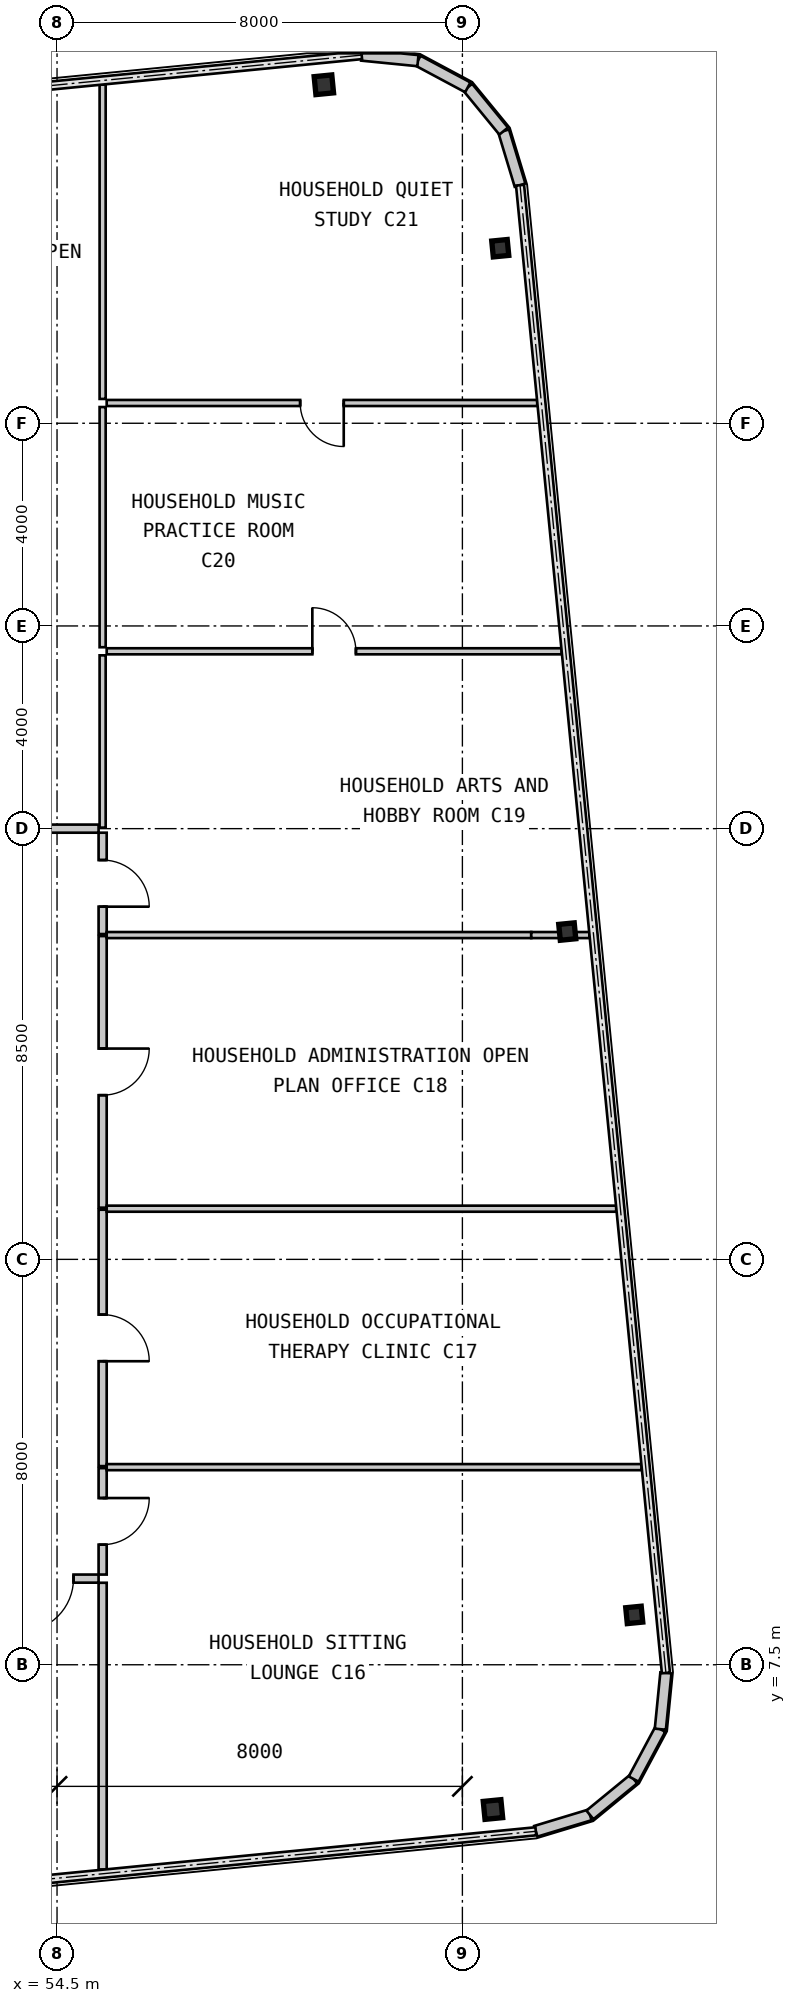
"""IFC4 building model, lengths in metres.
Left out: names, types, materials, properties, quantities, classifications, styles, units other than length and angle.
Written with IfcOpenShell. Run it as: python <this file> out.ifc"""

import sys

from ifc_helpers import new_model, si_unit, direction, frame, frame_2d, origin, origin_2d, place, context, subcontext, project, spatial, rectangle, i_section, extrude, source, transform, mapped, element, fill, save


model = new_model("IFC4")
c1 = context("Model", 3, precision=1e-05, world=origin(), true_north=direction((0.0, 1.0)))
c2 = subcontext(c1, "Body", "Model", "MODEL_VIEW")
j1 = project(units=[si_unit("LENGTHUNIT", "METRE"), si_unit("PLANEANGLEUNIT", "RADIAN")], contexts=[c1])
p1 = place(None, origin())
s1 = spatial("IfcSite", under=j1, at=p1, CompositionType="ELEMENT")
p2 = place(p1, origin())
s2 = spatial("IfcBuilding", under=s1, at=p2, CompositionType="ELEMENT")
p3 = place(p2, frame((0.0, 0.0, 68.25)))
s3 = spatial("IfcBuildingStorey", under=s2, at=p3, CompositionType="ELEMENT", Elevation=68.25)
m1 = source(origin(), c2, "Body", "SweptSolid", [
    extrude(i_section(OverallWidth=0.35, OverallDepth=0.356, WebThickness=0.018, FlangeThickness=0.028, at=origin_2d()), origin(), (0.0, 0.0, 1.0), 3.15),
])
for number, where, z_axis, x_axis in (
    (1, (63.103, 4.643, 0.0), (0.0, 0.0, 1.0), (0.995, 0.098, 0.0)),
    (2, (59.766, 38.68, 0.0), (0.0, 0.0, 1.0), (0.995, 0.098, 0.0)),
):
    element("IfcColumn", number, at=place(p3, frame(where, z_axis=z_axis, x_axis=x_axis)), inside=s3, PredefinedType="COLUMN", context=c2, shape_type="MappedRepresentation", body=[
        mapped(m1, transform((0.0, 0.0, 0.0), scale=1.0)),
    ])
m2 = source(origin(), c2, "Body", "SweptSolid", [
    extrude(i_section(OverallWidth=0.307, OverallDepth=0.315, WebThickness=0.012, FlangeThickness=0.019, at=origin_2d()), origin(), (0.0, 0.0, 1.0), 3.15),
])
for number, where, z_axis, x_axis in (
    (3, (65.892, 8.484, 0.0), (0.0, 0.0, 1.0), (0.995, 0.098, 0.0)),
    (4, (64.57, 21.969, 0.0), (0.0, 0.0, 1.0), (0.995, 0.098, 0.0)),
    (5, (63.247, 35.454, 0.0), (0.0, 0.0, 1.0), (0.995, 0.098, 0.0)),
):
    element("IfcColumn", number, at=place(p3, frame(where, z_axis=z_axis, x_axis=x_axis)), inside=s3, PredefinedType="COLUMN", context=c2, shape_type="MappedRepresentation", body=[
        mapped(m2, transform((0.0, 0.0, 0.0), scale=1.0)),
    ])
m3 = source(origin(), c2, "Body", "SweptSolid", [
    extrude(rectangle(XDim=1.116, YDim=0.22, at=frame_2d((0.558, 0.0))), origin(), (0.0, 0.0, 1.0), 2.93),
])
p4 = place(p3, frame((63.949, 4.214, 0.0), z_axis=(0.0, 0.0, 1.0), x_axis=(0.957052003726, 0.289916301997, 0.0)))
e6 = element("IfcWall", 6, at=p4, inside=s3, PredefinedType="SOLIDWALL", context=c2, shape_type="MappedRepresentation", body=[
    mapped(m3, transform((0.0, 0.0, 0.0), scale=1.0)),
])
m4 = source(origin(), c2, "Body", "SweptSolid", [
    extrude(rectangle(XDim=1.116, YDim=0.22, at=frame_2d((0.558, 0.0))), origin(), (0.0, 0.0, 1.0), 2.93),
])
p5 = place(p3, frame((65.017, 4.537, 0.0), z_axis=(0.0, 0.0, 1.0), x_axis=(0.773342870285, 0.633988016432, 0.0)))
e7 = element("IfcWall", 7, at=p5, inside=s3, PredefinedType="SOLIDWALL", context=c2, shape_type="MappedRepresentation", body=[
    mapped(m4, transform((0.0, 0.0, 0.0), scale=1.0)),
])
p6 = place(p3, frame((65.88, 5.245, 0.0), z_axis=(0.0, 0.0, 1.0), x_axis=(0.471723463201, 0.881746547635, 0.0)))
e8 = element("IfcWall", 8, at=p6, inside=s3, PredefinedType="SOLIDWALL", context=c2, shape_type="MappedRepresentation", body=[
    mapped(m3, transform((0.0, 0.0, 0.0), scale=1.0)),
])
for number, where, z_axis, x_axis in (
    (9, (66.406, 6.229, 0.0), (0.0, 0.0, 1.0), (0.098, 0.995, 0.0)),
    (10, (63.638, 36.698, 0.0), (0.0, 0.0, 1.0), (-0.29, 0.957, 0.0)),
):
    element("IfcWall", number, at=place(p3, frame(where, z_axis=z_axis, x_axis=x_axis)), inside=s3, PredefinedType="SOLIDWALL", context=c2, shape_type="MappedRepresentation", body=[
        mapped(m4, transform((0.0, 0.0, 0.0), scale=1.0)),
    ])
p7 = place(p3, frame((63.314, 37.766, 0.0), z_axis=(0.0, 0.0, 1.0), x_axis=(-0.634095287989, 0.773254916409, 0.0)))
e11 = element("IfcWall", 11, at=p7, inside=s3, PredefinedType="SOLIDWALL", context=c2, shape_type="MappedRepresentation", body=[
    mapped(m3, transform((0.0, 0.0, 0.0), scale=1.0)),
])
for number, where, z_axis, x_axis in (
    (12, (62.607, 38.629, 0.0), (0.0, 0.0, 1.0), (-0.882, 0.472, 0.0)),
    (13, (61.623, 39.156, 0.0), (0.0, 0.0, 1.0), (-0.995, 0.098, 0.0)),
):
    element("IfcWall", number, at=place(p3, frame(where, z_axis=z_axis, x_axis=x_axis)), inside=s3, PredefinedType="SOLIDWALL", context=c2, shape_type="MappedRepresentation", body=[
        mapped(m4, transform((0.0, 0.0, 0.0), scale=1.0)),
    ])
m5 = source(origin(), c2, "Body", "SweptSolid", [
    extrude(rectangle(XDim=2.04, YDim=0.16, at=frame_2d((1.02, 0.0))), origin(), (0.0, 0.0, 1.0), 2.93),
])
p8 = place(p3, frame((55.32, 9.2, 0.0), z_axis=(0.0, 0.0, 1.0), x_axis=(-1.0, 0.0, 0.0)))
e14 = element("IfcWall", 14, at=p8, inside=s3, PredefinedType="PARTITIONING", context=c2, shape_type="MappedRepresentation", body=[
    mapped(m5, transform((0.0, 0.0, 0.0), scale=1.0)),
])
m6 = source(origin(), c2, "Body", "SweptSolid", [
    extrude(rectangle(XDim=1.05, YDim=2.1, at=frame_2d((0.525, 1.05))), frame((0.0, 0.09, 0.0), z_axis=(0.0, -1.0, 0.0), x_axis=(1.0, 0.0, 0.0)), (0.0, 0.0, 1.0), 0.18),
])
p9 = place(p8, frame((0.495, 0.0, 0.0)))
e15 = element("IfcOpeningElement", 15, at=p9, cuts=e14, PredefinedType="OPENING", context=c2, shape_type="MappedRepresentation", body=[
    mapped(m6, transform((0.0, 0.0, 0.0), scale=1.0)),
])
m7 = source(origin(), c2, "Body", "SweptSolid", [
    extrude(rectangle(XDim=2.1, YDim=0.16, at=frame_2d((1.05, 0.0))), origin(), (0.0, 0.0, 1.0), 2.93),
])
p10 = place(p3, frame((55.4, 11.38, 0.0), z_axis=(0.0, 0.0, 1.0), x_axis=(0.0, -1.0, 0.0)))
e16 = element("IfcWall", 16, at=p10, inside=s3, PredefinedType="PARTITIONING", context=c2, shape_type="MappedRepresentation", body=[
    mapped(m7, transform((0.0, 0.0, 0.0), scale=1.0)),
])
m8 = source(origin(), c2, "Body", "SweptSolid", [
    extrude(rectangle(XDim=0.92, YDim=2.1, at=frame_2d((0.46, 1.05))), frame((0.0, 0.09, 0.0), z_axis=(0.0, -1.0, 0.0), x_axis=(1.0, 0.0, 0.0)), (0.0, 0.0, 1.0), 0.18),
])
p11 = place(p10, frame((0.59, 0.0, 0.0)))
e17 = element("IfcOpeningElement", 17, at=p11, cuts=e16, PredefinedType="OPENING", context=c2, shape_type="MappedRepresentation", body=[
    mapped(m8, transform((0.0, 0.0, 0.0), scale=1.0)),
])
m9 = source(origin(), c2, "Body", "SweptSolid", [
    extrude(rectangle(XDim=5.06, YDim=0.16, at=frame_2d((2.53, 0.0))), origin(), (0.0, 0.0, 1.0), 2.93),
])
p12 = place(p3, frame((55.4, 16.48, 0.0), z_axis=(0.0, 0.0, 1.0), x_axis=(0.0, -1.0, 0.0)))
e18 = element("IfcWall", 18, at=p12, inside=s3, PredefinedType="PARTITIONING", context=c2, shape_type="MappedRepresentation", body=[
    mapped(m9, transform((0.0, 0.0, 0.0), scale=1.0)),
])
p13 = place(p12, frame((2.07, 0.0, 0.0)))
e19 = element("IfcOpeningElement", 19, at=p13, cuts=e18, PredefinedType="OPENING", context=c2, shape_type="MappedRepresentation", body=[
    mapped(m8, transform((0.0, 0.0, 0.0), scale=1.0)),
])
m10 = source(origin(), c2, "Body", "SweptSolid", [
    extrude(rectangle(XDim=5.36, YDim=0.16, at=frame_2d((2.68, 0.0))), origin(), (0.0, 0.0, 1.0), 2.93),
])
p14 = place(p3, frame((55.4, 21.88, 0.0), z_axis=(0.0, 0.0, 1.0), x_axis=(0.0, -1.0, 0.0)))
e20 = element("IfcWall", 20, at=p14, inside=s3, PredefinedType="PARTITIONING", context=c2, shape_type="MappedRepresentation", body=[
    mapped(m10, transform((0.0, 0.0, 0.0), scale=1.0)),
])
p15 = place(p14, frame((2.22, 0.0, 0.0)))
e21 = element("IfcOpeningElement", 21, at=p15, cuts=e20, PredefinedType="OPENING", context=c2, shape_type="MappedRepresentation", body=[
    mapped(m8, transform((0.0, 0.0, 0.0), scale=1.0)),
])
m11 = source(origin(), c2, "Body", "SweptSolid", [
    extrude(rectangle(XDim=2.0, YDim=0.16, at=frame_2d((1.0, 0.0))), origin(), (0.0, 0.0, 1.0), 2.93),
])
p16 = place(p3, frame((55.4, 23.92, 0.0), z_axis=(0.0, 0.0, 1.0), x_axis=(0.0, -1.0, 0.0)))
e22 = element("IfcWall", 22, at=p16, inside=s3, PredefinedType="PARTITIONING", context=c2, shape_type="MappedRepresentation", body=[
    mapped(m11, transform((0.0, 0.0, 0.0), scale=1.0)),
])
p17 = place(p16, frame((0.54, 0.0, 0.0)))
e23 = element("IfcOpeningElement", 23, at=p17, cuts=e22, PredefinedType="OPENING", context=c2, shape_type="MappedRepresentation", body=[
    mapped(m8, transform((0.0, 0.0, 0.0), scale=1.0)),
])
m12 = source(origin(), c2, "Body", "SweptSolid", [
    extrude(rectangle(XDim=3.016, YDim=0.16, at=frame_2d((1.508, 0.0))), origin(), (0.0, 0.0, 1.0), 2.93),
])
p18 = place(p3, frame((52.304, 24.0, 0.0), z_axis=(0.0, 0.0, 1.0), x_axis=(1.0, 0.0, 0.0)))
e24 = element("IfcWall", 24, at=p18, inside=s3, PredefinedType="PARTITIONING", context=c2, shape_type="MappedRepresentation", body=[
    mapped(m12, transform((0.0, 0.0, 0.0), scale=1.0)),
])
m13 = source(origin(), c2, "Body", "SweptSolid", [
    extrude(rectangle(XDim=5.658, YDim=0.16, at=frame_2d((2.829, 0.0))), origin(), (0.0, 0.0, 1.0), 2.93),
])
p19 = place(p3, frame((55.4, 9.118, 0.0), z_axis=(0.0, 0.0, 1.0), x_axis=(0.0, -1.0, 0.0)))
e25 = element("IfcWall", 25, at=p19, inside=s3, PredefinedType="PARTITIONING", context=c2, shape_type="MappedRepresentation", body=[
    mapped(m13, transform((0.0, 0.0, 0.0), scale=1.0)),
])
m14 = source(origin(), c2, "Body", "SweptSolid", [
    extrude(rectangle(XDim=10.556, YDim=0.12, at=frame_2d((5.278, 0.0))), origin(), (0.0, 0.0, 1.0), 2.93),
])
p20 = place(p3, frame((55.48, 11.4, 0.0), z_axis=(0.0, 0.0, 1.0), x_axis=(1.0, 0.0, 0.0)))
e26 = element("IfcWall", 26, at=p20, inside=s3, PredefinedType="PARTITIONING", context=c2, shape_type="MappedRepresentation", body=[
    mapped(m14, transform((0.0, 0.0, 0.0), scale=1.0)),
])
m15 = source(origin(), c2, "Body", "SweptSolid", [
    extrude(rectangle(XDim=10.056, YDim=0.12, at=frame_2d((5.028, 0.0))), origin(), (0.0, 0.0, 1.0), 2.93),
])
p21 = place(p3, frame((55.48, 16.5, 0.0), z_axis=(0.0, 0.0, 1.0), x_axis=(1.0, 0.0, 0.0)))
e27 = element("IfcWall", 27, at=p21, inside=s3, PredefinedType="PARTITIONING", context=c2, shape_type="MappedRepresentation", body=[
    mapped(m15, transform((0.0, 0.0, 0.0), scale=1.0)),
])
m16 = source(origin(), c2, "Body", "SweptSolid", [
    extrude(rectangle(XDim=8.379, YDim=0.12, at=frame_2d((4.189, 0.0))), origin(), (0.0, 0.0, 1.0), 2.93),
])
p22 = place(p3, frame((55.48, 21.9, 0.0), z_axis=(0.0, 0.0, 1.0), x_axis=(1.0, 0.0, 0.0)))
e28 = element("IfcWall", 28, at=p22, inside=s3, PredefinedType="PARTITIONING", context=c2, shape_type="MappedRepresentation", body=[
    mapped(m16, transform((0.0, 0.0, 0.0), scale=1.0)),
])
m17 = source(origin(), c2, "Body", "SweptSolid", [
    extrude(rectangle(XDim=0.709, YDim=0.12, at=frame_2d((0.354, 0.0))), origin(), (0.0, 0.0, 1.0), 2.328),
])
p23 = place(p3, frame((63.859, 21.9, 0.0), z_axis=(0.0, 0.0, 1.0), x_axis=(1.0, 0.0, 0.0)))
e29 = element("IfcWall", 29, at=p23, inside=s3, PredefinedType="PARTITIONING", context=c2, shape_type="MappedRepresentation", body=[
    mapped(m17, transform((0.0, 0.0, 0.0), scale=1.0)),
])
m18 = source(origin(), c2, "Body", "SweptSolid", [
    extrude(rectangle(XDim=0.438, YDim=0.12, at=frame_2d((0.219, 0.0))), origin(), (0.0, 0.0, 1.0), 2.93),
])
p24 = place(p3, frame((64.568, 21.9, 0.0), z_axis=(0.0, 0.0, 1.0), x_axis=(1.0, 0.0, 0.0)))
e30 = element("IfcWall", 30, at=p24, inside=s3, PredefinedType="PARTITIONING", context=c2, shape_type="MappedRepresentation", body=[
    mapped(m18, transform((0.0, 0.0, 0.0), scale=1.0)),
])
m19 = source(origin(), c2, "Body", "SweptSolid", [
    extrude(rectangle(XDim=8.977, YDim=0.12, at=frame_2d((4.489, 0.0))), origin(), (0.0, 0.0, 1.0), 2.93),
])
p25 = place(p3, frame((55.48, 27.5, 0.0), z_axis=(0.0, 0.0, 1.0), x_axis=(1.0, 0.0, 0.0)))
e31 = element("IfcWall", 31, at=p25, inside=s3, PredefinedType="PARTITIONING", context=c2, shape_type="MappedRepresentation", body=[
    mapped(m19, transform((0.0, 0.0, 0.0), scale=1.0)),
])
m20 = source(origin(), c2, "Body", "SweptSolid", [
    extrude(rectangle(XDim=0.86, YDim=2.1, at=frame_2d((0.43, 1.05))), frame((0.0, 0.07, 0.0), z_axis=(0.0, -1.0, 0.0), x_axis=(1.0, 0.0, 0.0)), (0.0, 0.0, 1.0), 0.14),
])
p26 = place(p25, frame((4.059, 0.0, 0.0)))
e32 = element("IfcOpeningElement", 32, at=p26, cuts=e31, PredefinedType="OPENING", context=c2, shape_type="MappedRepresentation", body=[
    mapped(m20, transform((0.0, 0.0, 0.0), scale=1.0)),
])
m21 = source(origin(), c2, "Body", "SweptSolid", [
    extrude(rectangle(XDim=3.4, YDim=0.12, at=frame_2d((1.7, 0.0))), origin(), (0.0, 0.0, 1.0), 2.93),
])
p27 = place(p3, frame((55.4, 24.02, 0.0), z_axis=(0.0, 0.0, 1.0), x_axis=(0.0, 1.0, 0.0)))
e33 = element("IfcWall", 33, at=p27, inside=s3, PredefinedType="PARTITIONING", context=c2, shape_type="MappedRepresentation", body=[
    mapped(m21, transform((0.0, 0.0, 0.0), scale=1.0)),
])
m22 = source(origin(), c2, "Body", "SweptSolid", [
    extrude(rectangle(XDim=8.497, YDim=0.12, at=frame_2d((4.248, 0.0))), origin(), (0.0, 0.0, 1.0), 2.93),
])
p28 = place(p3, frame((55.48, 32.4, 0.0), z_axis=(0.0, 0.0, 1.0), x_axis=(1.0, 0.0, 0.0)))
e34 = element("IfcWall", 34, at=p28, inside=s3, PredefinedType="PARTITIONING", context=c2, shape_type="MappedRepresentation", body=[
    mapped(m22, transform((0.0, 0.0, 0.0), scale=1.0)),
])
p29 = place(p28, frame((3.818, 0.0, 0.0)))
e35 = element("IfcOpeningElement", 35, at=p29, cuts=e34, PredefinedType="OPENING", context=c2, shape_type="MappedRepresentation", body=[
    mapped(m20, transform((0.0, 0.0, 0.0), scale=1.0)),
])
m23 = source(origin(), c2, "Body", "SweptSolid", [
    extrude(rectangle(XDim=4.74, YDim=0.12, at=frame_2d((2.37, 0.0))), origin(), (0.0, 0.0, 1.0), 2.93),
])
p30 = place(p3, frame((55.4, 27.58, 0.0), z_axis=(0.0, 0.0, 1.0), x_axis=(0.0, 1.0, 0.0)))
e36 = element("IfcWall", 36, at=p30, inside=s3, PredefinedType="PARTITIONING", context=c2, shape_type="MappedRepresentation", body=[
    mapped(m23, transform((0.0, 0.0, 0.0), scale=1.0)),
])
m24 = source(origin(), c2, "Body", "SweptSolid", [
    extrude(rectangle(XDim=6.202, YDim=0.12, at=frame_2d((3.101, 0.0))), origin(), (0.0, 0.0, 1.0), 2.93),
])
p31 = place(p3, frame((55.4, 32.48, 0.0), z_axis=(0.0, 0.0, 1.0), x_axis=(0.0, 1.0, 0.0)))
e37 = element("IfcWall", 37, at=p31, inside=s3, PredefinedType="PARTITIONING", context=c2, shape_type="MappedRepresentation", body=[
    mapped(m24, transform((0.0, 0.0, 0.0), scale=1.0)),
])
m25 = source(origin(), c2, "Body", "SweptSolid", [
    extrude(rectangle(XDim=1.05, YDim=2.1, at=frame_2d((0.525, 1.05))), frame((0.0, 0.025, 0.0), z_axis=(0.0, -1.0, 0.0), x_axis=(1.0, 0.0, 0.0)), (0.0, 0.0, 1.0), 0.05),
])
p32 = place(p9, origin())
e38 = element("IfcDoor", 38, at=p32, inside=s3, OperationType="SINGLE_SWING_RIGHT", PredefinedType="DOOR", context=c2, shape_type="MappedRepresentation", body=[
    mapped(m25, transform((0.0, 0.0, 0.0), scale=1.0)),
])
fill(e15, e38)
m26 = source(origin(), c2, "Body", "SweptSolid", [
    extrude(rectangle(XDim=0.92, YDim=2.1, at=frame_2d((0.46, 1.05))), frame((0.0, 0.025, 0.0), z_axis=(0.0, -1.0, 0.0), x_axis=(1.0, 0.0, 0.0)), (0.0, 0.0, 1.0), 0.05),
])
p33 = place(p11, origin())
e39 = element("IfcDoor", 39, at=p33, inside=s3, OperationType="SINGLE_SWING_LEFT", PredefinedType="DOOR", context=c2, shape_type="MappedRepresentation", body=[
    mapped(m26, transform((0.0, 0.0, 0.0), scale=1.0)),
])
fill(e17, e39)
p34 = place(p13, origin())
e40 = element("IfcDoor", 40, at=p34, inside=s3, OperationType="SINGLE_SWING_RIGHT", PredefinedType="DOOR", context=c2, shape_type="MappedRepresentation", body=[
    mapped(m26, transform((0.0, 0.0, 0.0), scale=1.0)),
])
fill(e19, e40)
p35 = place(p15, origin())
e41 = element("IfcDoor", 41, at=p35, inside=s3, OperationType="SINGLE_SWING_LEFT", PredefinedType="DOOR", context=c2, shape_type="MappedRepresentation", body=[
    mapped(m26, transform((0.0, 0.0, 0.0), scale=1.0)),
])
fill(e21, e41)
p36 = place(p17, origin())
e42 = element("IfcDoor", 42, at=p36, inside=s3, OperationType="SINGLE_SWING_RIGHT", PredefinedType="DOOR", context=c2, shape_type="MappedRepresentation", body=[
    mapped(m26, transform((0.0, 0.0, 0.0), scale=1.0)),
])
fill(e23, e42)
m27 = source(origin(), c2, "Body", "SweptSolid", [
    extrude(rectangle(XDim=0.86, YDim=2.1, at=frame_2d((0.43, 1.05))), frame((0.0, 0.025, 0.0), z_axis=(0.0, -1.0, 0.0), x_axis=(1.0, 0.0, 0.0)), (0.0, 0.0, 1.0), 0.05),
])
p37 = place(p26, origin())
e43 = element("IfcDoor", 43, at=p37, inside=s3, OperationType="SINGLE_SWING_LEFT", PredefinedType="DOOR", context=c2, shape_type="MappedRepresentation", body=[
    mapped(m27, transform((0.0, 0.0, 0.0), scale=1.0)),
])
fill(e32, e43)
p38 = place(p29, frame((0.86, 0.0, 0.0), z_axis=(0.0, 0.0, 1.0), x_axis=(-1.0, 0.0, 0.0)))
e44 = element("IfcDoor", 44, at=p38, inside=s3, OperationType="SINGLE_SWING_LEFT", PredefinedType="DOOR", context=c2, shape_type="MappedRepresentation", body=[
    mapped(m27, transform((0.0, 0.0, 0.0), scale=1.0)),
])
fill(e35, e44)
save(model, sys.argv[1])
